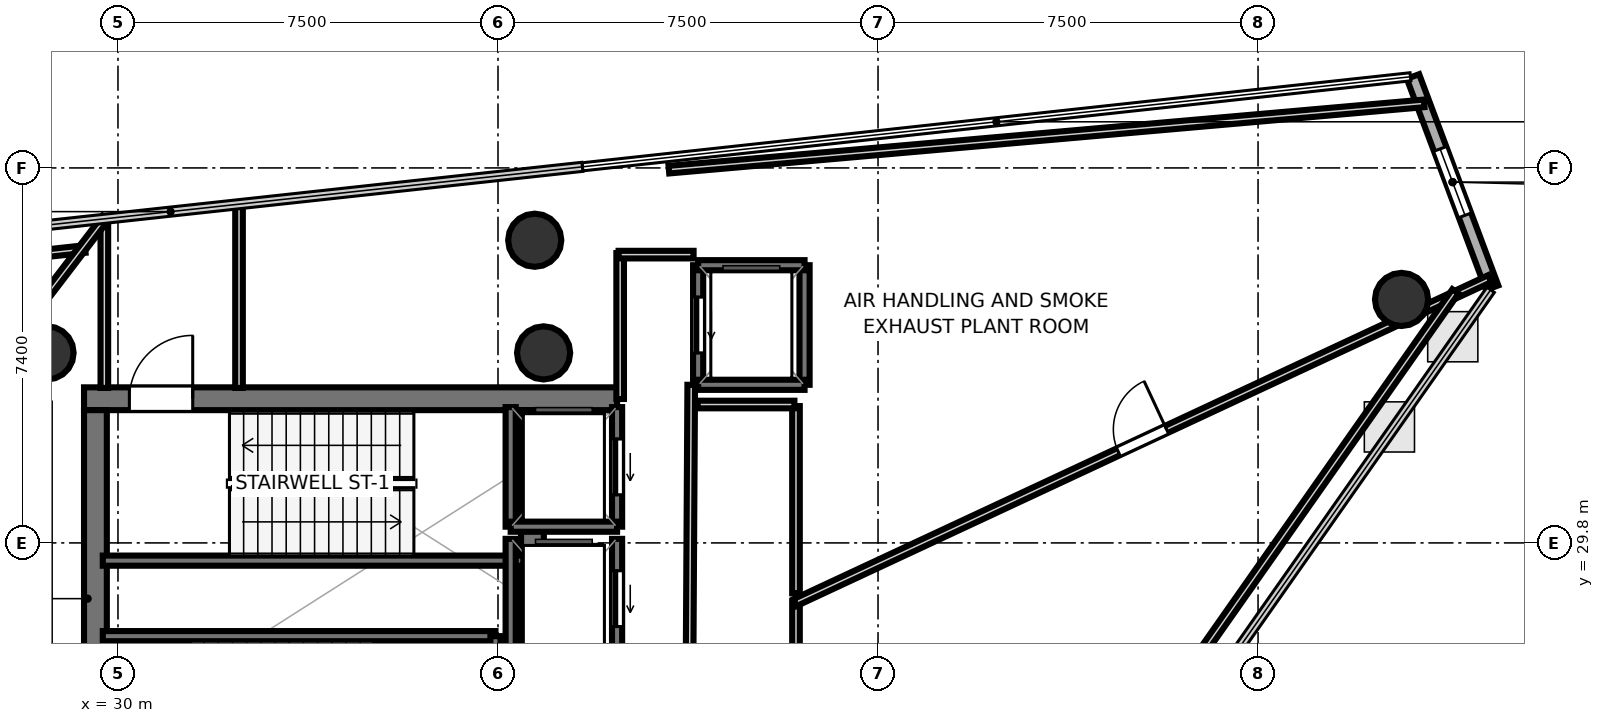
"""IFC4 building model, lengths in metres.
Left out: names, types, materials, properties, quantities, classifications, styles, units other than length and angle.
Written with IfcOpenShell. Run it as: python <this file> out.ifc"""

import sys

from ifc_helpers import new_model, si_unit, direction, frame, frame_2d, origin, origin_2d, place, context, subcontext, project, spatial, rectangle, hollow_circle, extrude, element, fill, save


model = new_model("IFC4")
c1 = context("Model", 3, precision=1e-05, world=origin(), true_north=direction((0.0, 1.0)))
c2 = subcontext(c1, "Body", "Model", "MODEL_VIEW")
j1 = project(units=[si_unit("LENGTHUNIT", "METRE"), si_unit("PLANEANGLEUNIT", "RADIAN")], contexts=[c1])
p1 = place(None, origin())
s1 = spatial("IfcSite", under=j1, at=p1, CompositionType="ELEMENT")
p2 = place(p1, origin())
s2 = spatial("IfcBuilding", under=s1, at=p2, CompositionType="ELEMENT")
p3 = place(p2, frame((0.0, 0.0, 276.0)))
s3 = spatial("IfcBuildingStorey", under=s2, at=p3, CompositionType="ELEMENT", Elevation=276.0)
p4 = place(p3, frame((29.33, 32.645, 0.0), z_axis=(0.0, 0.0, 1.0), x_axis=(1.0, 0.0, 0.0)))
e1 = element("IfcWall", 1, at=p4, inside=s3, PredefinedType="SHEAR", context=c2, shape_type="SweptSolid", body=[
    extrude(rectangle(XDim=10.52, YDim=0.45, at=frame_2d((5.26, 0.0))), origin(), (0.0, 0.0, 1.0), 4.42),
])
p5 = place(p4, frame((0.895, 0.0, 0.0)))
e2 = element("IfcOpeningElement", 2, at=p5, cuts=e1, PredefinedType="OPENING", context=c2, shape_type="SweptSolid", body=[
    extrude(rectangle(XDim=1.25, YDim=2.15, at=frame_2d((0.625, 1.075))), frame((0.0, 0.235, 0.0), z_axis=(0.0, -1.0, 0.0), x_axis=(1.0, 0.0, 0.0)), (0.0, 0.0, 1.0), 0.47),
])
for number, where, z_axis, x_axis in (
    (3, (29.555, 24.98, 0.0), (0.0, 0.0, 1.0), (0.0, 1.0, 0.0)),
    (4, (38.18, 24.98, 0.0), (0.0, 0.0, 1.0), (0.0, 1.0, 0.0)),
):
    element("IfcWall", number, at=place(p3, frame(where, z_axis=z_axis, x_axis=x_axis)), inside=s3, PredefinedType="SHEAR", context=c2, shape_type="SweptSolid", body=[
        extrude(rectangle(XDim=7.44, YDim=0.45, at=frame_2d((3.72, 0.0))), origin(), (0.0, 0.0, 1.0), 4.42),
    ])
for number, where, z_axis, x_axis in (
    (5, (28.6, 33.55, 0.0), (0.0, 0.0, 1.0), (1.0, 0.0, 0.0)),
    (6, (38.4, 33.55, 0.0), (0.0, 0.0, 1.0), (1.0, 0.0, 0.0)),
    (7, (55.332, 34.605, 0.0), (0.0, 0.0, 1.0), (1.0, 0.0, 0.0)),
    (8, (38.225, 35.773, 0.0), (0.0, 0.0, 1.0), (1.0, 0.0, 0.0)),
):
    element("IfcColumn", number, at=place(p3, frame(where, z_axis=z_axis, x_axis=x_axis)), inside=s3, PredefinedType="COLUMN", context=c2, shape_type="SweptSolid", body=[
        extrude(hollow_circle(Radius=0.525, WallThickness=0.028, at=origin_2d()), origin(), (0.0, 0.0, 1.0), 4.6),
    ])
p6 = place(p3, frame((57.12, 34.836, 0.0), z_axis=(0.0, 0.0, 1.0), x_axis=(-0.350828926288, 0.93643956798, 0.0)))
e9 = element("IfcWall", 9, at=p6, inside=s3, PredefinedType="SOLIDWALL", context=c2, shape_type="SweptSolid", body=[
    extrude(rectangle(XDim=4.452, YDim=0.26, at=frame_2d((2.226, 0.0))), origin(), (0.0, 0.0, 1.0), 4.42),
])
p7 = place(p6, frame((1.526, 0.0, 1.0)))
e10 = element("IfcOpeningElement", 10, at=p7, cuts=e9, PredefinedType="OPENING", context=c2, shape_type="SweptSolid", body=[
    extrude(rectangle(XDim=1.4, YDim=1.5, at=frame_2d((0.7, 0.75))), frame((0.0, 0.14, 0.0), z_axis=(0.0, -1.0, 0.0), x_axis=(1.0, 0.0, 0.0)), (0.0, 0.0, 1.0), 0.28),
])
p8 = place(p3, frame((29.7, 29.45, 0.0), z_axis=(0.0, 0.0, 1.0), x_axis=(1.0, 0.0, 0.0)))
e11 = element("IfcWall", 11, at=p8, inside=s3, PredefinedType="SOLIDWALL", context=c2, shape_type="SweptSolid", body=[
    extrude(rectangle(XDim=8.3, YDim=0.2, at=frame_2d((4.15, 0.0))), origin(), (0.0, 0.0, 1.0), 4.42),
])
p9 = place(p3, frame((29.7, 27.96, 0.0), z_axis=(0.0, 0.0, 1.0), x_axis=(1.0, 0.0, 0.0)))
e12 = element("IfcWall", 12, at=p9, inside=s3, PredefinedType="SOLIDWALL", context=c2, shape_type="SweptSolid", body=[
    extrude(rectangle(XDim=7.75, YDim=0.2, at=frame_2d((3.875, 0.0))), origin(), (0.0, 0.0, 1.0), 4.42),
])
p10 = place(p3, frame((37.45, 24.9, 0.0), z_axis=(0.0, 0.0, 1.0), x_axis=(0.0, 1.0, 0.0)))
e13 = element("IfcWall", 13, at=p10, inside=s3, PredefinedType="SOLIDWALL", context=c2, shape_type="SweptSolid", body=[
    extrude(rectangle(XDim=3.06, YDim=0.2, at=frame_2d((1.53, 0.0))), origin(), (0.0, 0.0, 1.0), 4.42),
])
p11 = place(p3, frame((39.85, 30.12, 0.0), z_axis=(0.0, 0.0, 1.0), x_axis=(0.0, 1.0, 0.0)))
e14 = element("IfcWall", 14, at=p11, inside=s3, PredefinedType="SOLIDWALL", context=c2, shape_type="SweptSolid", body=[
    extrude(rectangle(XDim=2.36, YDim=0.2, at=frame_2d((1.18, 0.0))), origin(), (0.0, 0.0, 1.0), 4.42),
])
p12 = place(p11, frame((0.63, 0.0, 0.0)))
e15 = element("IfcOpeningElement", 15, at=p12, cuts=e14, PredefinedType="OPENING", context=c2, shape_type="SweptSolid", body=[
    extrude(rectangle(XDim=1.1, YDim=2.15, at=frame_2d((0.55, 1.075))), frame((0.0, 0.11, 0.0), z_axis=(0.0, -1.0, 0.0), x_axis=(1.0, 0.0, 0.0)), (0.0, 0.0, 1.0), 0.22),
])
p13 = place(p3, frame((37.75, 30.12, 0.0), z_axis=(0.0, 0.0, 1.0), x_axis=(0.0, 1.0, 0.0)))
e16 = element("IfcWall", 16, at=p13, inside=s3, PredefinedType="SOLIDWALL", context=c2, shape_type="SweptSolid", body=[
    extrude(rectangle(XDim=2.36, YDim=0.2, at=frame_2d((1.18, 0.0))), origin(), (0.0, 0.0, 1.0), 4.42),
])
p14 = place(p3, frame((37.75, 30.12, 0.0), z_axis=(0.0, 0.0, 1.0), x_axis=(1.0, 0.0, 0.0)))
e17 = element("IfcWall", 17, at=p14, inside=s3, PredefinedType="SOLIDWALL", context=c2, shape_type="SweptSolid", body=[
    extrude(rectangle(XDim=2.1, YDim=0.2, at=frame_2d((1.05, 0.0))), origin(), (0.0, 0.0, 1.0), 4.42),
])
p15 = place(p3, frame((39.85, 27.52, 0.0), z_axis=(0.0, 0.0, 1.0), x_axis=(0.0, 1.0, 0.0)))
e18 = element("IfcWall", 18, at=p15, inside=s3, PredefinedType="SOLIDWALL", context=c2, shape_type="SweptSolid", body=[
    extrude(rectangle(XDim=2.36, YDim=0.2, at=frame_2d((1.18, 0.0))), origin(), (0.0, 0.0, 1.0), 4.42),
])
p16 = place(p15, frame((0.63, 0.0, 0.0)))
e19 = element("IfcOpeningElement", 19, at=p16, cuts=e18, PredefinedType="OPENING", context=c2, shape_type="SweptSolid", body=[
    extrude(rectangle(XDim=1.1, YDim=2.15, at=frame_2d((0.55, 1.075))), frame((0.0, 0.11, 0.0), z_axis=(0.0, -1.0, 0.0), x_axis=(1.0, 0.0, 0.0)), (0.0, 0.0, 1.0), 0.22),
])
p17 = place(p3, frame((37.75, 27.52, 0.0), z_axis=(0.0, 0.0, 1.0), x_axis=(0.0, 1.0, 0.0)))
e20 = element("IfcWall", 20, at=p17, inside=s3, PredefinedType="SOLIDWALL", context=c2, shape_type="SweptSolid", body=[
    extrude(rectangle(XDim=2.36, YDim=0.2, at=frame_2d((1.18, 0.0))), origin(), (0.0, 0.0, 1.0), 4.42),
])
p18 = place(p3, frame((43.55, 32.92, 0.0), z_axis=(0.0, 0.0, 1.0), x_axis=(0.0, 1.0, 0.0)))
e21 = element("IfcWall", 21, at=p18, inside=s3, PredefinedType="SOLIDWALL", context=c2, shape_type="SweptSolid", body=[
    extrude(rectangle(XDim=2.36, YDim=0.2, at=frame_2d((1.18, 0.0))), origin(), (0.0, 0.0, 1.0), 4.42),
])
p19 = place(p3, frame((41.45, 32.92, 0.0), z_axis=(0.0, 0.0, 1.0), x_axis=(0.0, 1.0, 0.0)))
e22 = element("IfcWall", 22, at=p19, inside=s3, PredefinedType="SOLIDWALL", context=c2, shape_type="SweptSolid", body=[
    extrude(rectangle(XDim=2.36, YDim=0.2, at=frame_2d((1.18, 0.0))), origin(), (0.0, 0.0, 1.0), 4.42),
])
p20 = place(p19, frame((0.63, 0.0, 0.0)))
e23 = element("IfcOpeningElement", 23, at=p20, cuts=e22, PredefinedType="OPENING", context=c2, shape_type="SweptSolid", body=[
    extrude(rectangle(XDim=1.1, YDim=2.15, at=frame_2d((0.55, 1.075))), frame((0.0, 0.11, 0.0), z_axis=(0.0, -1.0, 0.0), x_axis=(1.0, 0.0, 0.0)), (0.0, 0.0, 1.0), 0.22),
])
for number, where, z_axis, x_axis in (
    (24, (41.45, 35.28, 0.0), (0.0, 0.0, 1.0), (1.0, 0.0, 0.0)),
    (25, (41.45, 32.92, 0.0), (0.0, 0.0, 1.0), (1.0, 0.0, 0.0)),
):
    element("IfcWall", number, at=place(p3, frame(where, z_axis=z_axis, x_axis=x_axis)), inside=s3, PredefinedType="SOLIDWALL", context=c2, shape_type="SweptSolid", body=[
        extrude(rectangle(XDim=2.1, YDim=0.2, at=frame_2d((1.05, 0.0))), origin(), (0.0, 0.0, 1.0), 4.42),
    ])
p21 = place(p3, frame((29.731, 32.858, 0.0), z_axis=(0.0, 0.0, 1.0), x_axis=(0.0, 1.0, 0.0)))
e26 = element("IfcWall", 26, at=p21, inside=s3, PredefinedType="PARTITIONING", context=c2, shape_type="SweptSolid", body=[
    extrude(rectangle(XDim=3.357, YDim=0.15, at=frame_2d((1.679, 0.0))), origin(), (0.0, 0.0, 1.0), 2.94),
])
p22 = place(p3, frame((32.389, 36.504, 0.0), z_axis=(0.0, 0.0, 1.0), x_axis=(0.0, -1.0, 0.0)))
e27 = element("IfcWall", 27, at=p22, inside=s3, PredefinedType="PARTITIONING", context=c2, shape_type="SweptSolid", body=[
    extrude(rectangle(XDim=3.646, YDim=0.15, at=frame_2d((1.823, 0.0))), origin(), (0.0, 0.0, 1.0), 2.94),
])
p23 = place(p3, frame((39.911, 32.64, 0.0), z_axis=(0.0, 0.0, 1.0), x_axis=(0.0, 1.0, 0.0)))
e28 = element("IfcWall", 28, at=p23, inside=s3, PredefinedType="PARTITIONING", context=c2, shape_type="SweptSolid", body=[
    extrude(rectangle(XDim=2.88, YDim=0.15, at=frame_2d((1.44, 0.0))), origin(), (0.0, 0.0, 1.0), 2.94),
])
p24 = place(p3, frame((39.88, 35.489, 0.0), z_axis=(0.0, 0.0, 1.0), x_axis=(1.0, 0.0, 0.0)))
e29 = element("IfcWall", 29, at=p24, inside=s3, PredefinedType="PARTITIONING", context=c2, shape_type="SweptSolid", body=[
    extrude(rectangle(XDim=1.48, YDim=0.15, at=frame_2d((0.74, 0.0))), origin(), (0.0, 0.0, 1.0), 2.94),
])
p25 = place(p3, frame((41.313, 32.92, 0.0), z_axis=(0.0, 0.0, 1.0), x_axis=(-0.005942518022, -0.999982343084, 0.0)))
e30 = element("IfcWall", 30, at=p25, inside=s3, PredefinedType="PARTITIONING", context=c2, shape_type="SweptSolid", body=[
    extrude(rectangle(XDim=8.34, YDim=0.15, at=frame_2d((4.17, 0.0))), origin(), (0.0, 0.0, 1.0), 2.94),
])
p26 = place(p3, frame((25.845, 35.219, 0.0), z_axis=(0.0, 0.0, 1.0), x_axis=(0.994138480781, 0.108114203647, 0.0)))
e31 = element("IfcWall", 31, at=p26, inside=s3, PredefinedType="PARTITIONING", context=c2, shape_type="SweptSolid", body=[
    extrude(rectangle(XDim=3.527, YDim=0.15, at=frame_2d((1.764, 0.0))), origin(), (0.0, 0.0, 1.0), 2.94),
])
p27 = place(p3, frame((29.754, 36.212, 0.0), z_axis=(0.0, 0.0, 1.0), x_axis=(-0.607242587909, -0.794516481534, 0.0)))
e32 = element("IfcWall", 32, at=p27, inside=s3, PredefinedType="PARTITIONING", context=c2, shape_type="SweptSolid", body=[
    extrude(rectangle(XDim=3.145, YDim=0.15, at=frame_2d((1.572, 0.0))), origin(), (0.0, 0.0, 1.0), 2.94),
])
p28 = place(p3, frame((43.381, 24.85, 0.0), z_axis=(0.0, 0.0, 1.0), x_axis=(0.0, 1.0, 0.0)))
e33 = element("IfcWall", 33, at=p28, inside=s3, PredefinedType="PARTITIONING", context=c2, shape_type="SweptSolid", body=[
    extrude(rectangle(XDim=3.801, YDim=0.15, at=frame_2d((1.9, 0.0))), origin(), (0.0, 0.0, 1.0), 2.94),
])
p29 = place(p3, frame((43.363, 28.623, 0.0), z_axis=(0.0, 0.0, 1.0), x_axis=(0.90631008508, 0.422613333535, 0.0)))
e34 = element("IfcWall", 34, at=p29, inside=s3, PredefinedType="PARTITIONING", context=c2, shape_type="SweptSolid", body=[
    extrude(rectangle(XDim=15.128, YDim=0.15, at=frame_2d((7.564, 0.0))), origin(), (0.0, 0.0, 1.0), 2.94),
])
p30 = place(p29, frame((7.039, 0.0, 0.0)))
e35 = element("IfcOpeningElement", 35, at=p30, cuts=e34, PredefinedType="OPENING", context=c2, shape_type="SweptSolid", body=[
    extrude(rectangle(XDim=1.05, YDim=2.15, at=frame_2d((0.525, 1.075))), frame((0.0, 0.085, 0.0), z_axis=(0.0, -1.0, 0.0), x_axis=(1.0, 0.0, 0.0)), (0.0, 0.0, 1.0), 0.17),
])
p31 = place(p3, frame((56.396, 34.764, 0.0), z_axis=(0.0, 0.0, 1.0), x_axis=(-0.574813853257, -0.818284201304, 0.0)))
e36 = element("IfcWall", 36, at=p31, inside=s3, PredefinedType="PARTITIONING", context=c2, shape_type="SweptSolid", body=[
    extrude(rectangle(XDim=22.949, YDim=0.15, at=frame_2d((11.475, 0.0))), origin(), (0.0, 0.0, 1.0), 2.94),
])
p32 = place(p3, frame((40.873, 37.166, 0.0), z_axis=(0.0, 0.0, 1.0), x_axis=(0.99617083552, 0.087428064483, 0.0)))
e37 = element("IfcWall", 37, at=p32, inside=s3, PredefinedType="PARTITIONING", context=c2, shape_type="SweptSolid", body=[
    extrude(rectangle(XDim=14.962, YDim=0.15, at=frame_2d((7.481, 0.0))), origin(), (0.0, 0.0, 1.0), 2.94),
])
p33 = place(p3, frame((43.381, 28.805, 0.0), z_axis=(0.0, 0.0, 1.0), x_axis=(0.0, 1.0, 0.0)))
e38 = element("IfcWall", 38, at=p33, inside=s3, PredefinedType="PARTITIONING", context=c2, shape_type="SweptSolid", body=[
    extrude(rectangle(XDim=3.695, YDim=0.15, at=frame_2d((1.847, 0.0))), origin(), (0.0, 0.0, 1.0), 2.94),
])
p34 = place(p3, frame((43.35, 32.531, 0.0), z_axis=(0.0, 0.0, 1.0), x_axis=(-1.0, 0.0, 0.0)))
e39 = element("IfcWall", 39, at=p34, inside=s3, PredefinedType="PARTITIONING", context=c2, shape_type="SweptSolid", body=[
    extrude(rectangle(XDim=1.91, YDim=0.15, at=frame_2d((0.955, 0.0))), origin(), (0.0, 0.0, 1.0), 2.94),
])
p35 = place(p5, origin())
e40 = element("IfcDoor", 40, at=p35, inside=s3, OperationType="SINGLE_SWING_RIGHT", PredefinedType="DOOR", context=c2, shape_type="SweptSolid", body=[
    extrude(rectangle(XDim=1.25, YDim=2.15, at=frame_2d((0.625, 1.075))), frame((0.0, 0.025, 0.0), z_axis=(0.0, -1.0, 0.0), x_axis=(1.0, 0.0, 0.0)), (0.0, 0.0, 1.0), 0.05),
])
fill(e2, e40)
p36 = place(p12, origin())
e41 = element("IfcDoor", 41, at=p36, inside=s3, OperationType="SLIDING_TO_LEFT", PredefinedType="DOOR", context=c2, shape_type="SweptSolid", body=[
    extrude(rectangle(XDim=1.1, YDim=2.15, at=frame_2d((0.55, 1.075))), frame((0.0, 0.025, 0.0), z_axis=(0.0, -1.0, 0.0), x_axis=(1.0, 0.0, 0.0)), (0.0, 0.0, 1.0), 0.05),
])
fill(e15, e41)
p37 = place(p16, origin())
e42 = element("IfcDoor", 42, at=p37, inside=s3, OperationType="SLIDING_TO_LEFT", PredefinedType="DOOR", context=c2, shape_type="SweptSolid", body=[
    extrude(rectangle(XDim=1.1, YDim=2.15, at=frame_2d((0.55, 1.075))), frame((0.0, 0.025, 0.0), z_axis=(0.0, -1.0, 0.0), x_axis=(1.0, 0.0, 0.0)), (0.0, 0.0, 1.0), 0.05),
])
fill(e19, e42)
p38 = place(p20, origin())
e43 = element("IfcDoor", 43, at=p38, inside=s3, OperationType="SLIDING_TO_LEFT", PredefinedType="DOOR", context=c2, shape_type="SweptSolid", body=[
    extrude(rectangle(XDim=1.1, YDim=2.15, at=frame_2d((0.55, 1.075))), frame((0.0, 0.025, 0.0), z_axis=(0.0, -1.0, 0.0), x_axis=(1.0, 0.0, 0.0)), (0.0, 0.0, 1.0), 0.05),
])
fill(e23, e43)
p39 = place(p30, origin())
e44 = element("IfcDoor", 44, at=p39, inside=s3, OperationType="SINGLE_SWING_RIGHT", PredefinedType="DOOR", context=c2, shape_type="SweptSolid", body=[
    extrude(rectangle(XDim=1.05, YDim=2.15, at=frame_2d((0.525, 1.075))), frame((0.0, 0.025, 0.0), z_axis=(0.0, -1.0, 0.0), x_axis=(1.0, 0.0, 0.0)), (0.0, 0.0, 1.0), 0.05),
])
fill(e35, e44)
p40 = place(p7, origin())
e45 = element("IfcWindow", 45, at=p40, inside=s3, PartitioningType="SINGLE_PANEL", PredefinedType="WINDOW", context=c2, shape_type="SweptSolid", body=[
    extrude(rectangle(XDim=1.4, YDim=1.5, at=frame_2d((0.7, 0.75))), frame((0.0, 0.03, 0.0), z_axis=(0.0, -1.0, 0.0), x_axis=(1.0, 0.0, 0.0)), (0.0, 0.0, 1.0), 0.06),
])
fill(e10, e45)
save(model, sys.argv[1])
